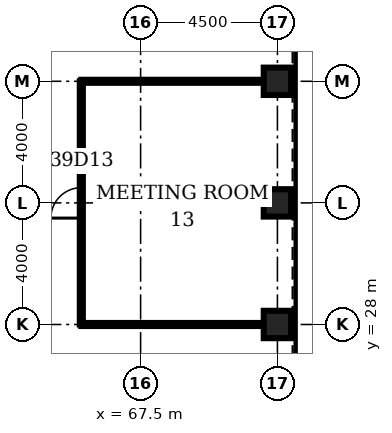
"""IFC4 building model, lengths in metres.
Left out: names, types, materials, properties, quantities, classifications, styles, units other than length and angle.
Written with IfcOpenShell. Run it as: python <this file> out.ifc"""

import sys

from ifc_helpers import new_model, si_unit, direction, frame, frame_2d, origin, origin_2d, place, context, subcontext, project, spatial, rectangle, hollow_rectangle, extrude, element, fill, save


model = new_model("IFC4")
c1 = context("Model", 3, precision=1e-05, world=origin(), true_north=direction((0.0, 1.0)))
c2 = subcontext(c1, "Body", "Model", "MODEL_VIEW")
j1 = project(units=[si_unit("LENGTHUNIT", "METRE"), si_unit("PLANEANGLEUNIT", "RADIAN")], contexts=[c1])
p1 = place(None, origin())
s1 = spatial("IfcSite", under=j1, at=p1, CompositionType="ELEMENT")
p2 = place(p1, origin())
s2 = spatial("IfcBuilding", under=s1, at=p2, CompositionType="ELEMENT")
p3 = place(p2, frame((0.0, 0.0, 176.1)))
s3 = spatial("IfcBuildingStorey", under=s2, at=p3, CompositionType="ELEMENT", Elevation=176.1)
for number, where, z_axis, x_axis in (
    (1, (72.0, 28.0, 0.0), (0.0, 0.0, 1.0), (1.0, 0.0, 0.0)),
    (2, (72.0, 32.0, 0.0), (0.0, 0.0, 1.0), (1.0, 0.0, 0.0)),
    (3, (72.0, 36.0, 0.0), (0.0, 0.0, 1.0), (1.0, 0.0, 0.0)),
):
    element("IfcColumn", number, at=place(p3, frame(where, z_axis=z_axis, x_axis=x_axis)), inside=s3, PredefinedType="COLUMN", context=c2, shape_type="SweptSolid", body=[
        extrude(hollow_rectangle(XDim=0.9, YDim=0.9, WallThickness=0.09, at=origin_2d()), origin(), (0.0, 0.0, 1.0), 4.2),
    ])
for number, where, z_axis, x_axis in (
    (4, (65.55, 28.0, 0.0), (0.0, 0.0, 1.0), (1.0, 0.0, 0.0)),
    (5, (65.55, 36.0, 0.0), (0.0, 0.0, 1.0), (1.0, 0.0, 0.0)),
):
    element("IfcWall", number, at=place(p3, frame(where, z_axis=z_axis, x_axis=x_axis)), inside=s3, PredefinedType="PARTITIONING", context=c2, shape_type="SweptSolid", body=[
        extrude(rectangle(XDim=6.0, YDim=0.1, at=frame_2d((3.0, 0.0))), origin(), (0.0, 0.0, 1.0), 3.0),
    ])
p4 = place(p3, frame((65.55, 28.0, 0.0), z_axis=(0.0, 0.0, 1.0), x_axis=(0.0, 1.0, 0.0)))
e6 = element("IfcWall", 6, at=p4, inside=s3, PredefinedType="PARTITIONING", context=c2, shape_type="SweptSolid", body=[
    extrude(rectangle(XDim=8.0, YDim=0.1, at=frame_2d((4.0, 0.0))), origin(), (0.0, 0.0, 1.0), 3.0),
])
p5 = place(p4, frame((3.5, 0.0, 0.0)))
e7 = element("IfcOpeningElement", 7, at=p5, cuts=e6, PredefinedType="OPENING", context=c2, shape_type="SweptSolid", body=[
    extrude(rectangle(XDim=1.0, YDim=2.1, at=frame_2d((0.5, 1.05))), frame((0.0, 0.06, 0.0), z_axis=(0.0, -1.0, 0.0), x_axis=(1.0, 0.0, 0.0)), (0.0, 0.0, 1.0), 0.12),
])
p6 = place(p5, origin())
e8 = element("IfcDoor", 8, at=p6, inside=s3, OperationType="SINGLE_SWING_LEFT", PredefinedType="DOOR", context=c2, shape_type="SweptSolid", body=[
    extrude(rectangle(XDim=1.0, YDim=2.1, at=frame_2d((0.5, 1.05))), frame((0.0, 0.025, 0.0), z_axis=(0.0, -1.0, 0.0), x_axis=(1.0, 0.0, 0.0)), (0.0, 0.0, 1.0), 0.05),
])
fill(e7, e8)
save(model, sys.argv[1])
